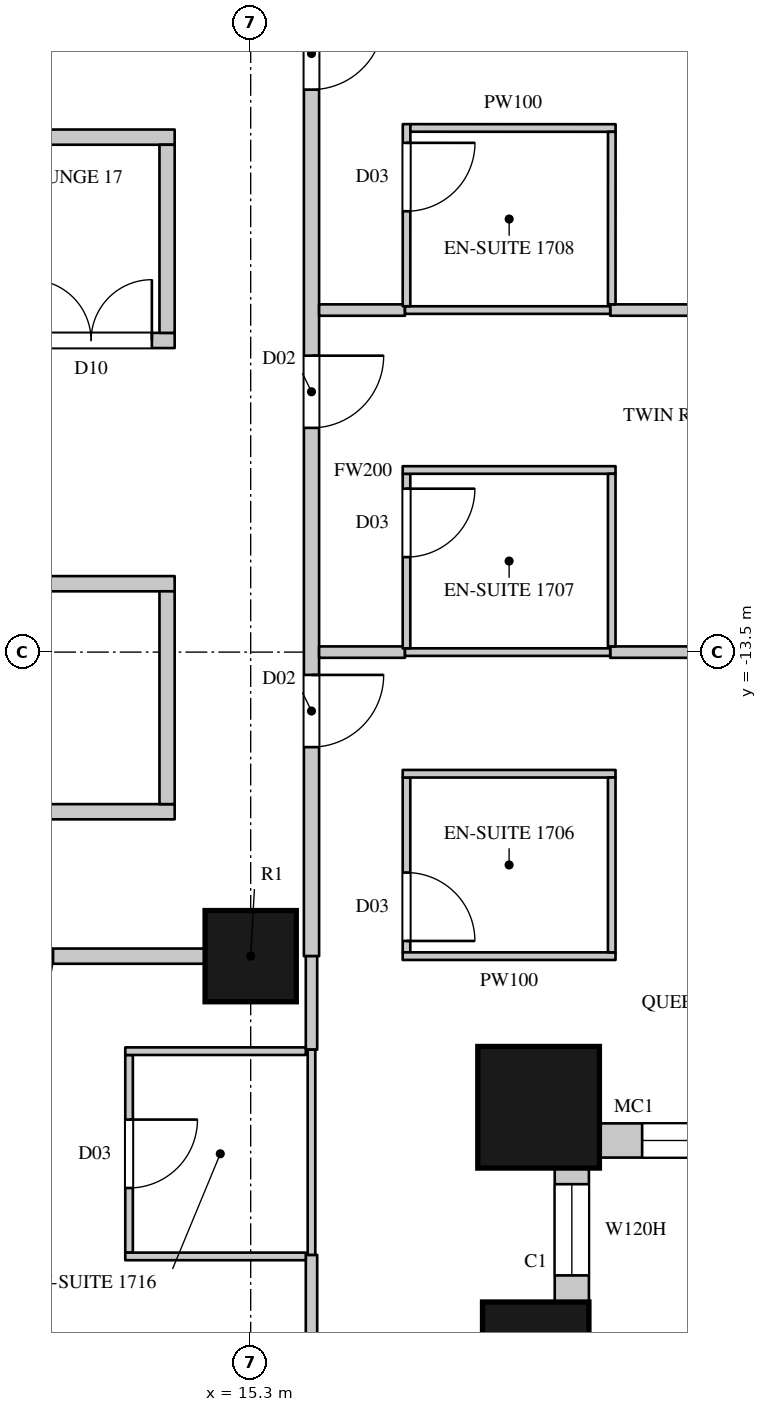
"""IFC4 building model, lengths in metres.
Left out: names, types, materials, properties, quantities, classifications, styles, units other than length and angle.
Written with IfcOpenShell. Run it as: python <this file> out.ifc"""

import sys

from ifc_helpers import new_model, si_unit, direction, frame, frame_2d, origin, origin_2d, place, context, subcontext, project, spatial, rectangle, circle, extrude, element, fill, save


model = new_model("IFC4")
c1 = context("Model", 3, precision=1e-05, world=origin(), true_north=direction((0.0, 1.0)))
c2 = subcontext(c1, "Body", "Model", "MODEL_VIEW")
j1 = project(units=[si_unit("LENGTHUNIT", "METRE"), si_unit("PLANEANGLEUNIT", "RADIAN")], contexts=[c1])
p1 = place(None, origin())
s1 = spatial("IfcSite", under=j1, at=p1, CompositionType="ELEMENT")
p2 = place(p1, origin())
s2 = spatial("IfcBuilding", under=s1, at=p2, CompositionType="ELEMENT")
p3 = place(p2, frame((0.0, 0.0, 91.5)))
s3 = spatial("IfcBuildingStorey", under=s2, at=p3, CompositionType="ELEMENT", Elevation=91.5)
p4 = place(p3, frame((19.05, -22.5, 0.0), z_axis=(0.0, 0.0, 1.0), x_axis=(0.0, 1.0, 0.0)))
e1 = element("IfcColumn", 1, at=p4, inside=s3, PredefinedType="COLUMN", context=c2, shape_type="SweptSolid", body=[
    extrude(rectangle(XDim=0.9, YDim=1.4, at=origin_2d()), origin(), (0.0, 0.0, 1.0), 3.6),
])
p5 = place(p3, frame((19.088, -19.488, 0.0), z_axis=(0.0, 0.0, 1.0), x_axis=(1.0, 0.0, 0.0)))
e2 = element("IfcColumn", 2, at=p5, inside=s3, PredefinedType="COLUMN", context=c2, shape_type="SweptSolid", body=[
    extrude(circle(Radius=0.8, at=origin_2d()), origin(), (0.0, 0.0, 1.0), 3.6),
])
p6 = place(p3, frame((15.3, -17.5, 0.0), z_axis=(0.0, 0.0, 1.0), x_axis=(1.0, 0.0, 0.0)))
e3 = element("IfcColumn", 3, at=p6, inside=s3, PredefinedType="COLUMN", context=c2, shape_type="SweptSolid", body=[
    extrude(circle(Radius=0.6, at=origin_2d()), origin(), (0.0, 0.0, 1.0), 3.6),
])
p7 = place(p3, frame((19.525, -22.05, 0.0), z_axis=(0.0, 0.0, 1.0), x_axis=(0.0, 1.0, 0.0)))
e4 = element("IfcWall", 4, at=p7, inside=s3, PredefinedType="SOLIDWALL", context=c2, shape_type="SweptSolid", body=[
    extrude(rectangle(XDim=1.792, YDim=0.45, at=frame_2d((0.896, 0.0))), origin(), (0.0, 0.0, 1.0), 3.3),
])
p8 = place(p7, frame((0.35, 0.0, 1.05)))
e5 = element("IfcOpeningElement", 5, at=p8, cuts=e4, PredefinedType="OPENING", context=c2, shape_type="SweptSolid", body=[
    extrude(rectangle(XDim=1.2, YDim=2.0, at=frame_2d((0.6, 1.0))), frame((0.0, 0.235, 0.0), z_axis=(0.0, -1.0, 0.0), x_axis=(1.0, 0.0, 0.0)), (0.0, 0.0, 1.0), 0.47),
])
p9 = place(p3, frame((19.858, -19.925, 0.0), z_axis=(0.0, 0.0, 1.0), x_axis=(1.0, 0.0, 0.0)))
e6 = element("IfcWall", 6, at=p9, inside=s3, PredefinedType="SOLIDWALL", context=c2, shape_type="SweptSolid", body=[
    extrude(rectangle(XDim=3.805, YDim=0.45, at=frame_2d((1.903, 0.0))), origin(), (0.0, 0.0, 1.0), 3.3),
])
p10 = place(p9, frame((0.592, 0.0, 1.05)))
e7 = element("IfcOpeningElement", 7, at=p10, cuts=e6, PredefinedType="OPENING", context=c2, shape_type="SweptSolid", body=[
    extrude(rectangle(XDim=2.7, YDim=2.0, at=frame_2d((1.35, 1.0))), frame((0.0, 0.235, 0.0), z_axis=(0.0, -1.0, 0.0), x_axis=(1.0, 0.0, 0.0)), (0.0, 0.0, 1.0), 0.47),
])
p11 = place(p3, frame((6.9, -17.5, 0.0), z_axis=(0.0, 0.0, 1.0), x_axis=(1.0, 0.0, 0.0)))
e8 = element("IfcWall", 8, at=p11, inside=s3, PredefinedType="PARTITIONING", context=c2, shape_type="SweptSolid", body=[
    extrude(rectangle(XDim=7.8, YDim=0.2, at=frame_2d((3.9, 0.0))), origin(), (0.0, 0.0, 1.0), 2.75),
])
p12 = place(p11, frame((2.4, 0.0, 0.0)))
e9 = element("IfcOpeningElement", 9, at=p12, cuts=e8, PredefinedType="OPENING", context=c2, shape_type="SweptSolid", body=[
    extrude(rectangle(XDim=0.95, YDim=2.2, at=frame_2d((0.475, 1.1))), frame((0.0, 0.11, 0.0), z_axis=(0.0, -1.0, 0.0), x_axis=(1.0, 0.0, 0.0)), (0.0, 0.0, 1.0), 0.22),
])
p13 = place(p11, frame((4.85, 0.0, 0.0)))
e10 = element("IfcOpeningElement", 10, at=p13, cuts=e8, PredefinedType="OPENING", context=c2, shape_type="SweptSolid", body=[
    extrude(rectangle(XDim=0.95, YDim=2.2, at=frame_2d((0.475, 1.1))), frame((0.0, 0.11, 0.0), z_axis=(0.0, -1.0, 0.0), x_axis=(1.0, 0.0, 0.0)), (0.0, 0.0, 1.0), 0.22),
])
p14 = place(p3, frame((0.1, -15.6, 0.0), z_axis=(0.0, 0.0, 1.0), x_axis=(1.0, 0.0, 0.0)))
e11 = element("IfcWall", 11, at=p14, inside=s3, PredefinedType="PARTITIONING", context=c2, shape_type="SweptSolid", body=[
    extrude(rectangle(XDim=14.2, YDim=0.2, at=frame_2d((7.1, 0.0))), origin(), (0.0, 0.0, 1.0), 3.3),
])
p15 = place(p3, frame((10.699, -12.6, 0.0), z_axis=(0.0, 0.0, 1.0), x_axis=(1.0, 0.0, 0.0)))
e12 = element("IfcWall", 12, at=p15, inside=s3, PredefinedType="PARTITIONING", context=c2, shape_type="SweptSolid", body=[
    extrude(rectangle(XDim=3.601, YDim=0.2, at=frame_2d((1.801, 0.0))), origin(), (0.0, 0.0, 1.0), 3.3),
])
p16 = place(p3, frame((10.9, -9.4, 0.0), z_axis=(0.0, 0.0, 1.0), x_axis=(1.0, 0.0, 0.0)))
e13 = element("IfcWall", 13, at=p16, inside=s3, PredefinedType="PARTITIONING", context=c2, shape_type="SweptSolid", body=[
    extrude(rectangle(XDim=3.4, YDim=0.2, at=frame_2d((1.7, 0.0))), origin(), (0.0, 0.0, 1.0), 3.3),
])
p17 = place(p16, frame((1.5, 0.0, 0.0)))
e14 = element("IfcOpeningElement", 14, at=p17, cuts=e13, PredefinedType="OPENING", context=c2, shape_type="SweptSolid", body=[
    extrude(rectangle(XDim=1.6, YDim=2.4, at=frame_2d((0.8, 1.2))), frame((0.0, 0.11, 0.0), z_axis=(0.0, -1.0, 0.0), x_axis=(1.0, 0.0, 0.0)), (0.0, 0.0, 1.0), 0.22),
])
p18 = place(p3, frame((10.9, -6.725, 0.0), z_axis=(0.0, 0.0, 1.0), x_axis=(1.0, 0.0, 0.0)))
e15 = element("IfcWall", 15, at=p18, inside=s3, PredefinedType="PARTITIONING", context=c2, shape_type="SweptSolid", body=[
    extrude(rectangle(XDim=3.4, YDim=0.2, at=frame_2d((1.7, 0.0))), origin(), (0.0, 0.0, 1.0), 3.3),
])
p19 = place(p3, frame((14.2, -15.5, 0.0), z_axis=(0.0, 0.0, 1.0), x_axis=(0.0, 1.0, 0.0)))
e16 = element("IfcWall", 16, at=p19, inside=s3, PredefinedType="PARTITIONING", context=c2, shape_type="SweptSolid", body=[
    extrude(rectangle(XDim=2.8, YDim=0.2, at=frame_2d((1.4, 0.0))), origin(), (0.0, 0.0, 1.0), 3.3),
])
p20 = place(p3, frame((14.2, -9.3, 0.0), z_axis=(0.0, 0.0, 1.0), x_axis=(0.0, 1.0, 0.0)))
e17 = element("IfcWall", 17, at=p20, inside=s3, PredefinedType="PARTITIONING", context=c2, shape_type="SweptSolid", body=[
    extrude(rectangle(XDim=2.475, YDim=0.2, at=frame_2d((1.238, 0.0))), origin(), (0.0, 0.0, 1.0), 3.3),
])
p21 = place(p3, frame((16.1, -17.5, 0.0), z_axis=(0.0, 0.0, 1.0), x_axis=(0.0, 1.0, 0.0)))
e18 = element("IfcWall", 18, at=p21, inside=s3, PredefinedType="PARTITIONING", context=c2, shape_type="SweptSolid", body=[
    extrude(rectangle(XDim=12.75, YDim=0.2, at=frame_2d((6.375, 0.0))), origin(), (0.0, 0.0, 1.0), 3.3),
])
p22 = place(p21, frame((2.75, 0.0, 0.0)))
e19 = element("IfcOpeningElement", 19, at=p22, cuts=e18, PredefinedType="OPENING", context=c2, shape_type="SweptSolid", body=[
    extrude(rectangle(XDim=0.95, YDim=2.2, at=frame_2d((0.475, 1.1))), frame((0.0, 0.11, 0.0), z_axis=(0.0, -1.0, 0.0), x_axis=(1.0, 0.0, 0.0)), (0.0, 0.0, 1.0), 0.22),
])
p23 = place(p21, frame((6.95, 0.0, 0.0)))
e20 = element("IfcOpeningElement", 20, at=p23, cuts=e18, PredefinedType="OPENING", context=c2, shape_type="SweptSolid", body=[
    extrude(rectangle(XDim=0.95, YDim=2.2, at=frame_2d((0.475, 1.1))), frame((0.0, 0.11, 0.0), z_axis=(0.0, -1.0, 0.0), x_axis=(1.0, 0.0, 0.0)), (0.0, 0.0, 1.0), 0.22),
])
p24 = place(p21, frame((11.4, 0.0, 0.0)))
e21 = element("IfcOpeningElement", 21, at=p24, cuts=e18, PredefinedType="OPENING", context=c2, shape_type="SweptSolid", body=[
    extrude(rectangle(XDim=0.95, YDim=2.2, at=frame_2d((0.475, 1.1))), frame((0.0, 0.11, 0.0), z_axis=(0.0, -1.0, 0.0), x_axis=(1.0, 0.0, 0.0)), (0.0, 0.0, 1.0), 0.22),
])
p25 = place(p3, frame((16.1, -25.7, 0.0), z_axis=(0.0, 0.0, 1.0), x_axis=(0.0, 1.0, 0.0)))
e22 = element("IfcWall", 22, at=p25, inside=s3, PredefinedType="PARTITIONING", context=c2, shape_type="SweptSolid", body=[
    extrude(rectangle(XDim=4.27, YDim=0.15, at=frame_2d((2.135, 0.0))), origin(), (0.0, 0.0, 1.0), 3.3),
])
p26 = place(p3, frame((16.1, -18.73, 0.0), z_axis=(0.0, 0.0, 1.0), x_axis=(0.0, 1.0, 0.0)))
e23 = element("IfcWall", 23, at=p26, inside=s3, PredefinedType="PARTITIONING", context=c2, shape_type="SweptSolid", body=[
    extrude(rectangle(XDim=1.23, YDim=0.15, at=frame_2d((0.615, 0.0))), origin(), (0.0, 0.0, 1.0), 3.3),
])
p27 = place(p3, frame((16.2, -13.5, 0.0), z_axis=(0.0, 0.0, 1.0), x_axis=(1.0, 0.0, 0.0)))
e24 = element("IfcWall", 24, at=p27, inside=s3, PredefinedType="PARTITIONING", context=c2, shape_type="SweptSolid", body=[
    extrude(rectangle(XDim=1.13, YDim=0.15, at=frame_2d((0.565, 0.0))), origin(), (0.0, 0.0, 1.0), 3.3),
])
p28 = place(p3, frame((16.2, -9.0, 0.0), z_axis=(0.0, 0.0, 1.0), x_axis=(1.0, 0.0, 0.0)))
e25 = element("IfcWall", 25, at=p28, inside=s3, PredefinedType="PARTITIONING", context=c2, shape_type="SweptSolid", body=[
    extrude(rectangle(XDim=1.13, YDim=0.15, at=frame_2d((0.565, 0.0))), origin(), (0.0, 0.0, 1.0), 2.65),
])
p29 = place(p3, frame((20.03, -13.5, 0.0), z_axis=(0.0, 0.0, 1.0), x_axis=(1.0, 0.0, 0.0)))
e26 = element("IfcWall", 26, at=p29, inside=s3, PredefinedType="PARTITIONING", context=c2, shape_type="SweptSolid", body=[
    extrude(rectangle(XDim=3.32, YDim=0.15, at=frame_2d((1.66, 0.0))), origin(), (0.0, 0.0, 1.0), 3.3),
])
p30 = place(p3, frame((20.03, -9.0, 0.0), z_axis=(0.0, 0.0, 1.0), x_axis=(1.0, 0.0, 0.0)))
e27 = element("IfcWall", 27, at=p30, inside=s3, PredefinedType="PARTITIONING", context=c2, shape_type="SweptSolid", body=[
    extrude(rectangle(XDim=4.27, YDim=0.15, at=frame_2d((2.135, 0.0))), origin(), (0.0, 0.0, 1.0), 2.65),
])
p31 = place(p3, frame((13.7, -21.4, 0.0), z_axis=(0.0, 0.0, 1.0), x_axis=(0.0, 1.0, 0.0)))
e28 = element("IfcWall", 28, at=p31, inside=s3, PredefinedType="PARTITIONING", context=c2, shape_type="SweptSolid", body=[
    extrude(rectangle(XDim=2.6, YDim=0.1, at=frame_2d((1.3, 0.0))), origin(), (0.0, 0.0, 1.0), 3.3),
])
p32 = place(p31, frame((0.85, 0.0, 0.0)))
e29 = element("IfcOpeningElement", 29, at=p32, cuts=e28, PredefinedType="OPENING", context=c2, shape_type="SweptSolid", body=[
    extrude(rectangle(XDim=0.9, YDim=2.2, at=frame_2d((0.45, 1.1))), frame((0.0, 0.06, 0.0), z_axis=(0.0, -1.0, 0.0), x_axis=(1.0, 0.0, 0.0)), (0.0, 0.0, 1.0), 0.12),
])
for number, where, z_axis, x_axis in (
    (30, (13.65, -21.45, 0.0), (0.0, 0.0, 1.0), (1.0, 0.0, 0.0)),
    (31, (13.65, -18.75, 0.0), (0.0, 0.0, 1.0), (1.0, 0.0, 0.0)),
):
    element("IfcWall", number, at=place(p3, frame(where, z_axis=z_axis, x_axis=x_axis)), inside=s3, PredefinedType="PARTITIONING", context=c2, shape_type="SweptSolid", body=[
        extrude(rectangle(XDim=2.375, YDim=0.1, at=frame_2d((1.188, 0.0))), origin(), (0.0, 0.0, 1.0), 3.3),
    ])
for number, where, z_axis, x_axis in (
    (32, (16.1, -21.43, 0.0), (0.0, 0.0, 1.0), (0.0, 1.0, 0.0)),
    (33, (17.33, -13.5, 0.0), (0.0, 0.0, 1.0), (1.0, 0.0, 0.0)),
):
    element("IfcWall", number, at=place(p3, frame(where, z_axis=z_axis, x_axis=x_axis)), inside=s3, PredefinedType="PARTITIONING", context=c2, shape_type="SweptSolid", body=[
        extrude(rectangle(XDim=2.7, YDim=0.1, at=frame_2d((1.35, 0.0))), origin(), (0.0, 0.0, 1.0), 3.3),
    ])
p33 = place(p3, frame((17.33, -9.0, 0.0), z_axis=(0.0, 0.0, 1.0), x_axis=(1.0, 0.0, 0.0)))
e34 = element("IfcWall", 34, at=p33, inside=s3, PredefinedType="PARTITIONING", context=c2, shape_type="SweptSolid", body=[
    extrude(rectangle(XDim=2.7, YDim=0.1, at=frame_2d((1.35, 0.0))), origin(), (0.0, 0.0, 1.0), 2.65),
])
p34 = place(p3, frame((17.35, -17.45, 0.0), z_axis=(0.0, 0.0, 1.0), x_axis=(0.0, 1.0, 0.0)))
e35 = element("IfcWall", 35, at=p34, inside=s3, PredefinedType="PARTITIONING", context=c2, shape_type="SweptSolid", body=[
    extrude(rectangle(XDim=2.3, YDim=0.1, at=frame_2d((1.15, 0.0))), origin(), (0.0, 0.0, 1.0), 3.3),
])
p35 = place(p34, frame((0.15, 0.0, 0.0)))
e36 = element("IfcOpeningElement", 36, at=p35, cuts=e35, PredefinedType="OPENING", context=c2, shape_type="SweptSolid", body=[
    extrude(rectangle(XDim=0.9, YDim=2.2, at=frame_2d((0.45, 1.1))), frame((0.0, 0.06, 0.0), z_axis=(0.0, -1.0, 0.0), x_axis=(1.0, 0.0, 0.0)), (0.0, 0.0, 1.0), 0.12),
])
for number, where, z_axis, x_axis in (
    (37, (17.3, -17.5, 0.0), (0.0, 0.0, 1.0), (1.0, 0.0, 0.0)),
    (38, (17.3, -15.1, 0.0), (0.0, 0.0, 1.0), (1.0, 0.0, 0.0)),
):
    element("IfcWall", number, at=place(p3, frame(where, z_axis=z_axis, x_axis=x_axis)), inside=s3, PredefinedType="PARTITIONING", context=c2, shape_type="SweptSolid", body=[
        extrude(rectangle(XDim=2.8, YDim=0.1, at=frame_2d((1.4, 0.0))), origin(), (0.0, 0.0, 1.0), 3.3),
    ])
p36 = place(p3, frame((17.35, -13.45, 0.0), z_axis=(0.0, 0.0, 1.0), x_axis=(0.0, 1.0, 0.0)))
e39 = element("IfcWall", 39, at=p36, inside=s3, PredefinedType="PARTITIONING", context=c2, shape_type="SweptSolid", body=[
    extrude(rectangle(XDim=2.296, YDim=0.1, at=frame_2d((1.148, 0.0))), origin(), (0.0, 0.0, 1.0), 3.3),
])
p37 = place(p36, frame((1.2, 0.0, 0.0)))
e40 = element("IfcOpeningElement", 40, at=p37, cuts=e39, PredefinedType="OPENING", context=c2, shape_type="SweptSolid", body=[
    extrude(rectangle(XDim=0.9, YDim=2.2, at=frame_2d((0.45, 1.1))), frame((0.0, 0.06, 0.0), z_axis=(0.0, -1.0, 0.0), x_axis=(1.0, 0.0, 0.0)), (0.0, 0.0, 1.0), 0.12),
])
p38 = place(p3, frame((17.3, -11.104, 0.0), z_axis=(0.0, 0.0, 1.0), x_axis=(1.0, 0.0, 0.0)))
e41 = element("IfcWall", 41, at=p38, inside=s3, PredefinedType="PARTITIONING", context=c2, shape_type="SweptSolid", body=[
    extrude(rectangle(XDim=2.8, YDim=0.1, at=frame_2d((1.4, 0.0))), origin(), (0.0, 0.0, 1.0), 3.3),
])
p39 = place(p3, frame((17.35, -8.95, 0.0), z_axis=(0.0, 0.0, 1.0), x_axis=(0.000407580973, 0.999999916939, 0.0)))
e42 = element("IfcWall", 42, at=p39, inside=s3, PredefinedType="PARTITIONING", context=c2, shape_type="SweptSolid", body=[
    extrude(rectangle(XDim=2.396, YDim=0.1, at=frame_2d((1.198, 0.0))), origin(), (0.0, 0.0, 1.0), 3.3),
])
p40 = place(p39, frame((1.25, 0.0, 0.0)))
e43 = element("IfcOpeningElement", 43, at=p40, cuts=e42, PredefinedType="OPENING", context=c2, shape_type="SweptSolid", body=[
    extrude(rectangle(XDim=0.9, YDim=2.2, at=frame_2d((0.45, 1.1))), frame((0.0, 0.06, 0.0), z_axis=(0.0, -1.0, 0.0), x_axis=(1.0, 0.0, 0.0)), (0.0, 0.0, 1.0), 0.12),
])
p41 = place(p3, frame((17.401, -6.604, 0.0), z_axis=(0.0, 0.0, 1.0), x_axis=(0.9999999346, -0.000361663629, 0.0)))
e44 = element("IfcWall", 44, at=p41, inside=s3, PredefinedType="PARTITIONING", context=c2, shape_type="SweptSolid", body=[
    extrude(rectangle(XDim=2.7, YDim=0.1, at=frame_2d((1.35, 0.0))), origin(), (0.0, 0.0, 1.0), 3.3),
])
p42 = place(p3, frame((20.05, -17.45, 0.0), z_axis=(0.0, 0.0, 1.0), x_axis=(0.0, 1.0, 0.0)))
e45 = element("IfcWall", 45, at=p42, inside=s3, PredefinedType="PARTITIONING", context=c2, shape_type="SweptSolid", body=[
    extrude(rectangle(XDim=2.3, YDim=0.1, at=frame_2d((1.15, 0.0))), origin(), (0.0, 0.0, 1.0), 3.3),
])
p43 = place(p3, frame((20.05, -13.425, 0.0), z_axis=(0.0, 0.0, 1.0), x_axis=(0.0, 1.0, 0.0)))
e46 = element("IfcWall", 46, at=p43, inside=s3, PredefinedType="PARTITIONING", context=c2, shape_type="SweptSolid", body=[
    extrude(rectangle(XDim=2.271, YDim=0.1, at=frame_2d((1.135, 0.0))), origin(), (0.0, 0.0, 1.0), 3.3),
])
p44 = place(p3, frame((20.05, -8.925, 0.0), z_axis=(0.0, 0.0, 1.0), x_axis=(0.000430200003, 0.999999907464, 0.0)))
e47 = element("IfcWall", 47, at=p44, inside=s3, PredefinedType="PARTITIONING", context=c2, shape_type="SweptSolid", body=[
    extrude(rectangle(XDim=2.27, YDim=0.1, at=frame_2d((1.135, 0.0))), origin(), (0.0, 0.0, 1.0), 3.3),
])
p45 = place(p8, origin())
e48 = element("IfcWindow", 48, at=p45, inside=s3, PartitioningType="SINGLE_PANEL", PredefinedType="WINDOW", context=c2, shape_type="SweptSolid", body=[
    extrude(rectangle(XDim=1.2, YDim=2.0, at=frame_2d((0.6, 1.0))), frame((0.0, 0.135, 0.0), z_axis=(0.0, -1.0, 0.0), x_axis=(1.0, 0.0, 0.0)), (0.0, 0.0, 1.0), 0.06),
])
fill(e5, e48)
p46 = place(p10, origin())
e49 = element("IfcWindow", 49, at=p46, inside=s3, PartitioningType="SINGLE_PANEL", PredefinedType="WINDOW", context=c2, shape_type="SweptSolid", body=[
    extrude(rectangle(XDim=2.7, YDim=2.0, at=frame_2d((1.35, 1.0))), frame((0.0, 0.135, 0.0), z_axis=(0.0, -1.0, 0.0), x_axis=(1.0, 0.0, 0.0)), (0.0, 0.0, 1.0), 0.06),
])
fill(e7, e49)
p47 = place(p17, origin())
e50 = element("IfcDoor", 50, at=p47, inside=s3, OperationType="DOUBLE_DOOR_SINGLE_SWING", PredefinedType="DOOR", context=c2, shape_type="SweptSolid", body=[
    extrude(rectangle(XDim=1.6, YDim=2.4, at=frame_2d((0.8, 1.2))), frame((0.0, 0.025, 0.0), z_axis=(0.0, -1.0, 0.0), x_axis=(1.0, 0.0, 0.0)), (0.0, 0.0, 1.0), 0.05),
])
fill(e14, e50)
p48 = place(p22, origin())
e51 = element("IfcDoor", 51, at=p48, inside=s3, OperationType="SINGLE_SWING_LEFT", PredefinedType="DOOR", context=c2, shape_type="SweptSolid", body=[
    extrude(rectangle(XDim=0.95, YDim=2.2, at=frame_2d((0.475, 1.1))), frame((0.0, 0.025, 0.0), z_axis=(0.0, -1.0, 0.0), x_axis=(1.0, 0.0, 0.0)), (0.0, 0.0, 1.0), 0.05),
])
fill(e19, e51)
p49 = place(p35, origin())
e52 = element("IfcDoor", 52, at=p49, inside=s3, OperationType="SINGLE_SWING_RIGHT", PredefinedType="DOOR", context=c2, shape_type="SweptSolid", body=[
    extrude(rectangle(XDim=0.9, YDim=2.2, at=frame_2d((0.45, 1.1))), frame((0.0, 0.025, 0.0), z_axis=(0.0, -1.0, 0.0), x_axis=(1.0, 0.0, 0.0)), (0.0, 0.0, 1.0), 0.05),
])
fill(e36, e52)
p50 = place(p23, origin())
e53 = element("IfcDoor", 53, at=p50, inside=s3, OperationType="SINGLE_SWING_LEFT", PredefinedType="DOOR", context=c2, shape_type="SweptSolid", body=[
    extrude(rectangle(XDim=0.95, YDim=2.2, at=frame_2d((0.475, 1.1))), frame((0.0, 0.025, 0.0), z_axis=(0.0, -1.0, 0.0), x_axis=(1.0, 0.0, 0.0)), (0.0, 0.0, 1.0), 0.05),
])
fill(e20, e53)
p51 = place(p37, origin())
e54 = element("IfcDoor", 54, at=p51, inside=s3, OperationType="SINGLE_SWING_LEFT", PredefinedType="DOOR", context=c2, shape_type="SweptSolid", body=[
    extrude(rectangle(XDim=0.9, YDim=2.2, at=frame_2d((0.45, 1.1))), frame((0.0, 0.025, 0.0), z_axis=(0.0, -1.0, 0.0), x_axis=(1.0, 0.0, 0.0)), (0.0, 0.0, 1.0), 0.05),
])
fill(e40, e54)
p52 = place(p24, origin())
e55 = element("IfcDoor", 55, at=p52, inside=s3, OperationType="SINGLE_SWING_LEFT", PredefinedType="DOOR", context=c2, shape_type="SweptSolid", body=[
    extrude(rectangle(XDim=0.95, YDim=2.2, at=frame_2d((0.475, 1.1))), frame((0.0, 0.025, 0.0), z_axis=(0.0, -1.0, 0.0), x_axis=(1.0, 0.0, 0.0)), (0.0, 0.0, 1.0), 0.05),
])
fill(e21, e55)
p53 = place(p40, origin())
e56 = element("IfcDoor", 56, at=p53, inside=s3, OperationType="SINGLE_SWING_LEFT", PredefinedType="DOOR", context=c2, shape_type="SweptSolid", body=[
    extrude(rectangle(XDim=0.9, YDim=2.2, at=frame_2d((0.45, 1.1))), frame((0.0, 0.025, 0.0), z_axis=(0.0, -1.0, 0.0), x_axis=(1.0, 0.0, 0.0)), (0.0, 0.0, 1.0), 0.05),
])
fill(e43, e56)
p54 = place(p13, origin())
e57 = element("IfcDoor", 57, at=p54, inside=s3, OperationType="SINGLE_SWING_RIGHT", PredefinedType="DOOR", context=c2, shape_type="SweptSolid", body=[
    extrude(rectangle(XDim=0.95, YDim=2.2, at=frame_2d((0.475, 1.1))), frame((0.0, 0.025, 0.0), z_axis=(0.0, -1.0, 0.0), x_axis=(1.0, 0.0, 0.0)), (0.0, 0.0, 1.0), 0.05),
])
fill(e10, e57)
p55 = place(p32, origin())
e58 = element("IfcDoor", 58, at=p55, inside=s3, OperationType="SINGLE_SWING_LEFT", PredefinedType="DOOR", context=c2, shape_type="SweptSolid", body=[
    extrude(rectangle(XDim=0.9, YDim=2.2, at=frame_2d((0.45, 1.1))), frame((0.0, 0.025, 0.0), z_axis=(0.0, -1.0, 0.0), x_axis=(1.0, 0.0, 0.0)), (0.0, 0.0, 1.0), 0.05),
])
fill(e29, e58)
save(model, sys.argv[1])
